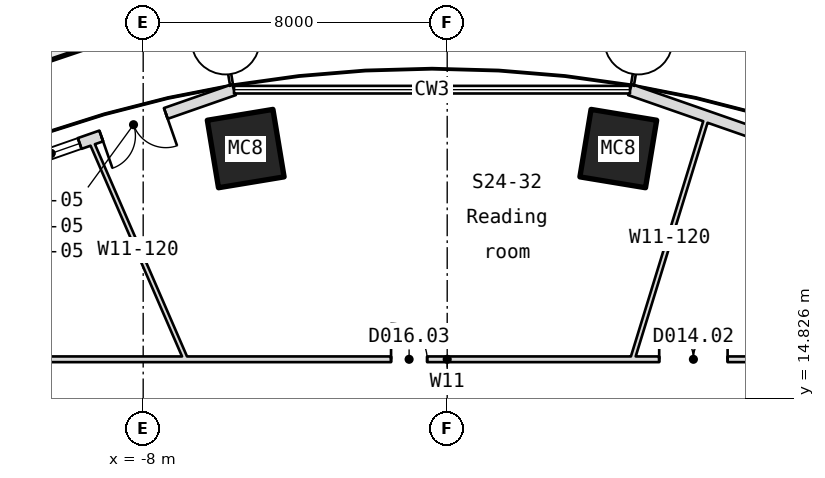
"""IFC4 building model, lengths in metres.
Left out: names, types, materials, properties, quantities, classifications, styles, units other than length and angle.
Written with IfcOpenShell. Run it as: python <this file> out.ifc"""

import sys

from ifc_helpers import new_model, si_unit, direction, frame, frame_2d, origin, origin_2d, place, context, subcontext, project, spatial, rectangle, hollow_rectangle, extrude, element, fill, save


model = new_model("IFC4")
c1 = context("Model", 3, precision=1e-05, world=origin(), true_north=direction((0.0, 1.0)))
c2 = subcontext(c1, "Body", "Model", "MODEL_VIEW")
j1 = project(units=[si_unit("LENGTHUNIT", "METRE"), si_unit("PLANEANGLEUNIT", "RADIAN")], contexts=[c1])
p1 = place(None, origin())
s1 = spatial("IfcSite", under=j1, at=p1, CompositionType="ELEMENT")
p2 = place(p1, origin())
s2 = spatial("IfcBuilding", under=s1, at=p2, CompositionType="ELEMENT")
p3 = place(p2, frame((0.0, 0.0, 346.75)))
s3 = spatial("IfcBuildingStorey", under=s2, at=p3, CompositionType="ELEMENT", Elevation=346.75)
for number, where, z_axis, x_axis in (
    (1, (4.502, 21.395, -0.18), (0.0, 0.0, 1.0), (0.987, -0.163, 0.0)),
    (2, (-5.302, 21.395, -0.18), (0.0, 0.0, 1.0), (0.987, 0.163, 0.0)),
):
    element("IfcColumn", number, at=place(p3, frame(where, z_axis=z_axis, x_axis=x_axis)), inside=s3, PredefinedType="COLUMN", context=c2, shape_type="SweptSolid", body=[
        extrude(hollow_rectangle(XDim=1.75, YDim=1.8, WallThickness=0.055, at=origin_2d()), origin(), (0.0, 0.0, 1.0), 4.15),
    ])
p4 = place(p3, frame((14.438, 19.588, 0.0), z_axis=(0.0, 0.0, 1.0), x_axis=(-0.944272378507, 0.329165118428, 0.0)))
e3 = element("IfcWall", 3, at=p4, inside=s3, PredefinedType="SOLIDWALL", context=c2, shape_type="SweptSolid", body=[
    extrude(rectangle(XDim=10.195, YDim=0.3, at=frame_2d((5.098, 0.0))), origin(), (0.0, 0.0, 1.0), 3.97),
])
p5 = place(p4, frame((1.9, 0.0, 0.0)))
e4 = element("IfcOpeningElement", 4, at=p5, cuts=e3, PredefinedType="OPENING", context=c2, shape_type="SweptSolid", body=[
    extrude(rectangle(XDim=1.8, YDim=2.4, at=frame_2d((0.9, 1.2))), frame((0.0, 0.16, 0.0), z_axis=(0.0, -1.0, 0.0), x_axis=(1.0, 0.0, 0.0)), (0.0, 0.0, 1.0), 0.32),
])
p6 = place(p4, frame((4.3, 0.0, 0.9)))
e5 = element("IfcOpeningElement", 5, at=p6, cuts=e3, PredefinedType="OPENING", context=c2, shape_type="SweptSolid", body=[
    extrude(rectangle(XDim=1.6, YDim=1.5, at=frame_2d((0.8, 0.75))), frame((0.0, 0.16, 0.0), z_axis=(0.0, -1.0, 0.0), x_axis=(1.0, 0.0, 0.0)), (0.0, 0.0, 1.0), 0.32),
])
p7 = place(p3, frame((-5.61, 22.944, 0.0), z_axis=(0.0, 0.0, 1.0), x_axis=(-0.944272378507, -0.329165118428, 0.0)))
e6 = element("IfcWall", 6, at=p7, inside=s3, PredefinedType="SOLIDWALL", context=c2, shape_type="SweptSolid", body=[
    extrude(rectangle(XDim=10.195, YDim=0.3, at=frame_2d((5.098, 0.0))), origin(), (0.0, 0.0, 1.0), 3.97),
])
p8 = place(p7, frame((1.9, 0.0, 0.0)))
e7 = element("IfcOpeningElement", 7, at=p8, cuts=e6, PredefinedType="OPENING", context=c2, shape_type="SweptSolid", body=[
    extrude(rectangle(XDim=1.8, YDim=2.4, at=frame_2d((0.9, 1.2))), frame((0.0, 0.16, 0.0), z_axis=(0.0, -1.0, 0.0), x_axis=(1.0, 0.0, 0.0)), (0.0, 0.0, 1.0), 0.32),
])
p9 = place(p7, frame((4.3, 0.0, 0.9)))
e8 = element("IfcOpeningElement", 8, at=p9, cuts=e6, PredefinedType="OPENING", context=c2, shape_type="SweptSolid", body=[
    extrude(rectangle(XDim=1.6, YDim=1.5, at=frame_2d((0.8, 0.75))), frame((0.0, 0.16, 0.0), z_axis=(0.0, -1.0, 0.0), x_axis=(1.0, 0.0, 0.0)), (0.0, 0.0, 1.0), 0.32),
])
p10 = place(p3, frame((-14.18, 15.85, 0.0), z_axis=(0.0, 0.0, 1.0), x_axis=(1.0, 0.0, 0.0)))
e9 = element("IfcWall", 9, at=p10, inside=s3, PredefinedType="PARTITIONING", context=c2, shape_type="SweptSolid", body=[
    extrude(rectangle(XDim=28.361, YDim=0.15, at=frame_2d((14.18, 0.0))), origin(), (0.0, 0.0, 1.0), 3.97),
])
p11 = place(p10, frame((19.759, 0.0, 0.0)))
e10 = element("IfcOpeningElement", 10, at=p11, cuts=e9, PredefinedType="OPENING", context=c2, shape_type="SweptSolid", body=[
    extrude(rectangle(XDim=1.8, YDim=2.1, at=frame_2d((0.9, 1.05))), frame((0.0, 0.085, 0.0), z_axis=(0.0, -1.0, 0.0), x_axis=(1.0, 0.0, 0.0)), (0.0, 0.0, 1.0), 0.17),
])
p12 = place(p10, frame((12.703, 0.0, 0.0)))
e11 = element("IfcOpeningElement", 11, at=p12, cuts=e9, PredefinedType="OPENING", context=c2, shape_type="SweptSolid", body=[
    extrude(rectangle(XDim=0.95, YDim=2.1, at=frame_2d((0.475, 1.05))), frame((0.0, 0.085, 0.0), z_axis=(0.0, -1.0, 0.0), x_axis=(1.0, 0.0, 0.0)), (0.0, 0.0, 1.0), 0.17),
])
p13 = place(p3, frame((-6.88, 15.85, 0.0), z_axis=(0.0, 0.0, 1.0), x_axis=(-0.398181745678, 0.91730654495, 0.0)))
e12 = element("IfcWall", 12, at=p13, inside=s3, PredefinedType="PARTITIONING", context=c2, shape_type="SweptSolid", body=[
    extrude(rectangle(XDim=6.298, YDim=0.12, at=frame_2d((3.149, 0.0))), origin(), (0.0, 0.0, 1.0), 3.97),
])
p14 = place(p3, frame((4.874, 15.85, 0.0), z_axis=(0.0, 0.0, 1.0), x_axis=(0.293957481335, 0.955818496979, 0.0)))
e13 = element("IfcWall", 13, at=p14, inside=s3, PredefinedType="PARTITIONING", context=c2, shape_type="SweptSolid", body=[
    extrude(rectangle(XDim=6.682, YDim=0.12, at=frame_2d((3.341, 0.0))), origin(), (0.0, 0.0, 1.0), 3.97),
])
p15 = place(p8, origin())
e14 = element("IfcDoor", 14, at=p15, inside=s3, OperationType="SINGLE_SWING_LEFT", PredefinedType="DOOR", context=c2, shape_type="SweptSolid", body=[
    extrude(rectangle(XDim=1.8, YDim=2.4, at=frame_2d((0.9, 1.2))), frame((0.0, 0.025, 0.0), z_axis=(0.0, -1.0, 0.0), x_axis=(1.0, 0.0, 0.0)), (0.0, 0.0, 1.0), 0.05),
])
fill(e7, e14)
p16 = place(p9, origin())
e15 = element("IfcWindow", 15, at=p16, inside=s3, PartitioningType="SINGLE_PANEL", PredefinedType="WINDOW", context=c2, shape_type="SweptSolid", body=[
    extrude(rectangle(XDim=1.6, YDim=1.5, at=frame_2d((0.8, 0.75))), frame((0.0, 0.03, 0.0), z_axis=(0.0, -1.0, 0.0), x_axis=(1.0, 0.0, 0.0)), (0.0, 0.0, 1.0), 0.06),
])
fill(e8, e15)
p17 = place(p11, origin())
e16 = element("IfcDoor", 16, at=p17, inside=s3, OperationType="DOUBLE_DOOR_SINGLE_SWING", PredefinedType="DOOR", context=c2, shape_type="SweptSolid", body=[
    extrude(rectangle(XDim=1.8, YDim=2.1, at=frame_2d((0.9, 1.05))), frame((0.0, 0.025, 0.0), z_axis=(0.0, -1.0, 0.0), x_axis=(1.0, 0.0, 0.0)), (0.0, 0.0, 1.0), 0.05),
])
fill(e10, e16)
p18 = place(p12, origin())
e17 = element("IfcDoor", 17, at=p18, inside=s3, OperationType="SINGLE_SWING_RIGHT", PredefinedType="DOOR", context=c2, shape_type="SweptSolid", body=[
    extrude(rectangle(XDim=0.95, YDim=2.1, at=frame_2d((0.475, 1.05))), frame((0.0, 0.025, 0.0), z_axis=(0.0, -1.0, 0.0), x_axis=(1.0, 0.0, 0.0)), (0.0, 0.0, 1.0), 0.05),
])
fill(e11, e17)
save(model, sys.argv[1])
